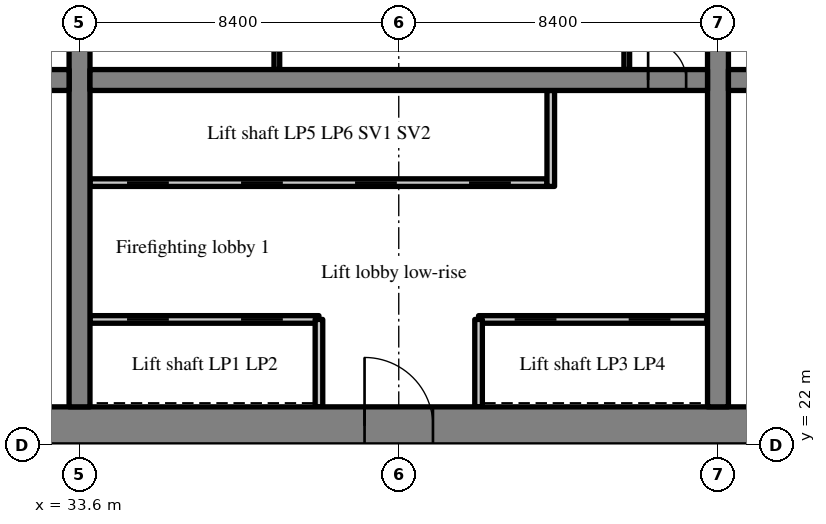
"""IFC4 building model, lengths in metres.
Left out: names, types, materials, properties, quantities, classifications, styles, units other than length and angle.
Written with IfcOpenShell. Run it as: python <this file> out.ifc"""

import sys

from ifc_helpers import new_model, si_unit, direction, frame, frame_2d, origin, place, context, subcontext, project, spatial, rectangle, extrude, source, transform, mapped, element, fill, save


model = new_model("IFC4")
c1 = context("Model", 3, precision=1e-05, world=origin(), true_north=direction((0.0, 1.0)))
c2 = subcontext(c1, "Body", "Model", "MODEL_VIEW")
j1 = project(units=[si_unit("LENGTHUNIT", "METRE"), si_unit("PLANEANGLEUNIT", "RADIAN")], contexts=[c1])
p1 = place(None, origin())
s1 = spatial("IfcSite", under=j1, at=p1, CompositionType="ELEMENT")
p2 = place(p1, origin())
s2 = spatial("IfcBuilding", under=s1, at=p2, CompositionType="ELEMENT")
p3 = place(p2, frame((0.0, 0.0, 62.0)))
s3 = spatial("IfcBuildingStorey", under=s2, at=p3, CompositionType="ELEMENT", Elevation=62.0)
m1 = source(origin(), c2, "Body", "SweptSolid", [
    extrude(rectangle(XDim=50.4, YDim=1.0, at=frame_2d((25.2, 0.0))), origin(), (0.0, 0.0, 1.0), 3.52),
])
p4 = place(p3, frame((25.2, 22.5, 0.0), z_axis=(0.0, 0.0, 1.0), x_axis=(1.0, 0.0, 0.0)))
e1 = element("IfcWall", 1, at=p4, inside=s3, PredefinedType="SHEAR", context=c2, shape_type="MappedRepresentation", body=[
    mapped(m1, transform((0.0, 0.0, 0.0), scale=1.0)),
])
m2 = source(origin(), c2, "Body", "SweptSolid", [
    extrude(rectangle(XDim=1.8, YDim=2.1, at=frame_2d((0.9, 1.05))), frame((0.0, 0.51, 0.0), z_axis=(0.0, -1.0, 0.0), x_axis=(1.0, 0.0, 0.0)), (0.0, 0.0, 1.0), 1.02),
])
p5 = place(p4, frame((15.9, 0.0, 0.0)))
e2 = element("IfcOpeningElement", 2, at=p5, cuts=e1, PredefinedType="OPENING", context=c2, shape_type="MappedRepresentation", body=[
    mapped(m2, transform((0.0, 0.0, 0.0), scale=1.0)),
])
m3 = source(origin(), c2, "Body", "SweptSolid", [
    extrude(rectangle(XDim=1.2, YDim=2.1, at=frame_2d((0.6, 1.05))), frame((0.0, 0.51, 0.0), z_axis=(0.0, -1.0, 0.0), x_axis=(1.0, 0.0, 0.0)), (0.0, 0.0, 1.0), 1.02),
])
p6 = place(p4, frame((26.987, 0.0, 0.0)))
e3 = element("IfcOpeningElement", 3, at=p6, cuts=e1, PredefinedType="OPENING", context=c2, shape_type="MappedRepresentation", body=[
    mapped(m3, transform((0.0, 0.0, 0.0), scale=1.0)),
])
m4 = source(origin(), c2, "Body", "SweptSolid", [
    extrude(rectangle(XDim=0.9, YDim=2.1, at=frame_2d((0.45, 1.05))), frame((0.0, 0.51, 0.0), z_axis=(0.0, -1.0, 0.0), x_axis=(1.0, 0.0, 0.0)), (0.0, 0.0, 1.0), 1.02),
])
p7 = place(p4, frame((34.5, 0.0, 0.0)))
e4 = element("IfcOpeningElement", 4, at=p7, cuts=e1, PredefinedType="OPENING", context=c2, shape_type="MappedRepresentation", body=[
    mapped(m4, transform((0.0, 0.0, 0.0), scale=1.0)),
])
p8 = place(p4, frame((31.5, 0.0, 0.0)))
e5 = element("IfcOpeningElement", 5, at=p8, cuts=e1, PredefinedType="OPENING", context=c2, shape_type="MappedRepresentation", body=[
    mapped(m4, transform((0.0, 0.0, 0.0), scale=1.0)),
])
p9 = place(p4, frame((39.769, 0.0, 0.0)))
e6 = element("IfcOpeningElement", 6, at=p9, cuts=e1, PredefinedType="OPENING", context=c2, shape_type="MappedRepresentation", body=[
    mapped(m4, transform((0.0, 0.0, 0.0), scale=1.0)),
])
p10 = place(p4, frame((36.756, 0.0, 0.0)))
e7 = element("IfcOpeningElement", 7, at=p10, cuts=e1, PredefinedType="OPENING", context=c2, shape_type="MappedRepresentation", body=[
    mapped(m4, transform((0.0, 0.0, 0.0), scale=1.0)),
])
p11 = place(p4, frame((6.438, 0.0, 0.0)))
e8 = element("IfcOpeningElement", 8, at=p11, cuts=e1, PredefinedType="OPENING", context=c2, shape_type="MappedRepresentation", body=[
    mapped(m3, transform((0.0, 0.0, 0.0), scale=1.0)),
])
p12 = place(p4, frame((47.725, 0.0, 0.0)))
e9 = element("IfcOpeningElement", 9, at=p12, cuts=e1, PredefinedType="OPENING", context=c2, shape_type="MappedRepresentation", body=[
    mapped(m3, transform((0.0, 0.0, 0.0), scale=1.0)),
])
m5 = source(origin(), c2, "Body", "SweptSolid", [
    extrude(rectangle(XDim=18.0, YDim=0.55, at=frame_2d((9.0, 0.0))), origin(), (0.0, 0.0, 1.0), 3.52),
])
p13 = place(p3, frame((33.6, 23.0, 0.0), z_axis=(0.0, 0.0, 1.0), x_axis=(0.0, 1.0, 0.0)))
e10 = element("IfcWall", 10, at=p13, inside=s3, PredefinedType="SHEAR", context=c2, shape_type="MappedRepresentation", body=[
    mapped(m5, transform((0.0, 0.0, 0.0), scale=1.0)),
])
m6 = source(origin(), c2, "Body", "SweptSolid", [
    extrude(rectangle(XDim=1.1, YDim=2.1, at=frame_2d((0.55, 1.05))), frame((0.0, 0.285, 0.0), z_axis=(0.0, -1.0, 0.0), x_axis=(1.0, 0.0, 0.0)), (0.0, 0.0, 1.0), 0.57),
])
p14 = place(p13, frame((12.45, 0.0, 0.0)))
e11 = element("IfcOpeningElement", 11, at=p14, cuts=e10, PredefinedType="OPENING", context=c2, shape_type="MappedRepresentation", body=[
    mapped(m6, transform((0.0, 0.0, 0.0), scale=1.0)),
])
p15 = place(p3, frame((50.4, 23.0, 0.0), z_axis=(0.0, 0.0, 1.0), x_axis=(0.0, 1.0, 0.0)))
e12 = element("IfcWall", 12, at=p15, inside=s3, PredefinedType="SHEAR", context=c2, shape_type="MappedRepresentation", body=[
    mapped(m5, transform((0.0, 0.0, 0.0), scale=1.0)),
])
p16 = place(p15, frame((12.45, 0.0, 0.0)))
e13 = element("IfcOpeningElement", 13, at=p16, cuts=e12, PredefinedType="OPENING", context=c2, shape_type="MappedRepresentation", body=[
    mapped(m6, transform((0.0, 0.0, 0.0), scale=1.0)),
])
m7 = source(origin(), c2, "Body", "SweptSolid", [
    extrude(rectangle(XDim=7.125, YDim=0.55, at=frame_2d((3.562, 0.0))), origin(), (0.0, 0.0, 1.0), 3.52),
])
p17 = place(p3, frame((26.2, 31.6, 0.0), z_axis=(0.0, 0.0, 1.0), x_axis=(1.0, 0.0, 0.0)))
e14 = element("IfcWall", 14, at=p17, inside=s3, PredefinedType="SHEAR", context=c2, shape_type="MappedRepresentation", body=[
    mapped(m7, transform((0.0, 0.0, 0.0), scale=1.0)),
])
p18 = place(p17, frame((5.488, 0.0, 0.0)))
e15 = element("IfcOpeningElement", 15, at=p18, cuts=e14, PredefinedType="OPENING", context=c2, shape_type="MappedRepresentation", body=[
    mapped(m6, transform((0.0, 0.0, 0.0), scale=1.0)),
])
m8 = source(origin(), c2, "Body", "SweptSolid", [
    extrude(rectangle(XDim=16.25, YDim=0.55, at=frame_2d((8.125, 0.0))), origin(), (0.0, 0.0, 1.0), 3.52),
])
p19 = place(p3, frame((33.875, 31.6, 0.0), z_axis=(0.0, 0.0, 1.0), x_axis=(1.0, 0.0, 0.0)))
e16 = element("IfcWall", 16, at=p19, inside=s3, PredefinedType="SHEAR", context=c2, shape_type="MappedRepresentation", body=[
    mapped(m8, transform((0.0, 0.0, 0.0), scale=1.0)),
])
m9 = source(origin(), c2, "Body", "SweptSolid", [
    extrude(rectangle(XDim=1.0, YDim=2.1, at=frame_2d((0.5, 1.05))), frame((0.0, 0.285, 0.0), z_axis=(0.0, -1.0, 0.0), x_axis=(1.0, 0.0, 0.0)), (0.0, 0.0, 1.0), 0.57),
])
p20 = place(p19, frame((14.687, 0.0, 0.0)))
e17 = element("IfcOpeningElement", 17, at=p20, cuts=e16, PredefinedType="OPENING", context=c2, shape_type="MappedRepresentation", body=[
    mapped(m9, transform((0.0, 0.0, 0.0), scale=1.0)),
])
p21 = place(p3, frame((50.675, 31.6, 0.0), z_axis=(0.0, 0.0, 1.0), x_axis=(1.0, 0.0, 0.0)))
e18 = element("IfcWall", 18, at=p21, inside=s3, PredefinedType="SHEAR", context=c2, shape_type="MappedRepresentation", body=[
    mapped(m8, transform((0.0, 0.0, 0.0), scale=1.0)),
])
p22 = place(p21, frame((0.562, 0.0, 0.0)))
e19 = element("IfcOpeningElement", 19, at=p22, cuts=e18, PredefinedType="OPENING", context=c2, shape_type="MappedRepresentation", body=[
    mapped(m9, transform((0.0, 0.0, 0.0), scale=1.0)),
])
m10 = source(origin(), c2, "Body", "SweptSolid", [
    extrude(rectangle(XDim=6.025, YDim=0.2, at=frame_2d((3.012, 0.0))), origin(), (0.0, 0.0, 1.0), 3.52),
])
p23 = place(p3, frame((33.875, 25.3, 0.0), z_axis=(0.0, 0.0, 1.0), x_axis=(1.0, 0.0, 0.0)))
e20 = element("IfcWall", 20, at=p23, inside=s3, PredefinedType="SOLIDWALL", context=c2, shape_type="MappedRepresentation", body=[
    mapped(m10, transform((0.0, 0.0, 0.0), scale=1.0)),
])
m11 = source(origin(), c2, "Body", "SweptSolid", [
    extrude(rectangle(XDim=1.1, YDim=2.1, at=frame_2d((0.55, 1.05))), frame((0.0, 0.11, 0.0), z_axis=(0.0, -1.0, 0.0), x_axis=(1.0, 0.0, 0.0)), (0.0, 0.0, 1.0), 0.22),
])
p24 = place(p23, frame((0.975, 0.0, 0.0)))
e21 = element("IfcOpeningElement", 21, at=p24, cuts=e20, PredefinedType="OPENING", context=c2, shape_type="MappedRepresentation", body=[
    mapped(m11, transform((0.0, 0.0, 0.0), scale=1.0)),
])
p25 = place(p23, frame((3.975, 0.0, 0.0)))
e22 = element("IfcOpeningElement", 22, at=p25, cuts=e20, PredefinedType="OPENING", context=c2, shape_type="MappedRepresentation", body=[
    mapped(m11, transform((0.0, 0.0, 0.0), scale=1.0)),
])
m12 = source(origin(), c2, "Body", "SweptSolid", [
    extrude(rectangle(XDim=6.0, YDim=0.2, at=frame_2d((3.0, 0.0))), origin(), (0.0, 0.0, 1.0), 3.52),
])
p26 = place(p3, frame((44.1, 25.3, 0.0), z_axis=(0.0, 0.0, 1.0), x_axis=(1.0, 0.0, 0.0)))
e23 = element("IfcWall", 23, at=p26, inside=s3, PredefinedType="SOLIDWALL", context=c2, shape_type="MappedRepresentation", body=[
    mapped(m12, transform((0.0, 0.0, 0.0), scale=1.0)),
])
p27 = place(p26, frame((0.95, 0.0, 0.0)))
e24 = element("IfcOpeningElement", 24, at=p27, cuts=e23, PredefinedType="OPENING", context=c2, shape_type="MappedRepresentation", body=[
    mapped(m11, transform((0.0, 0.0, 0.0), scale=1.0)),
])
p28 = place(p26, frame((3.95, 0.0, 0.0)))
e25 = element("IfcOpeningElement", 25, at=p28, cuts=e23, PredefinedType="OPENING", context=c2, shape_type="MappedRepresentation", body=[
    mapped(m11, transform((0.0, 0.0, 0.0), scale=1.0)),
])
m13 = source(origin(), c2, "Body", "SweptSolid", [
    extrude(rectangle(XDim=12.025, YDim=0.2, at=frame_2d((6.012, 0.0))), origin(), (0.0, 0.0, 1.0), 3.52),
])
p29 = place(p3, frame((33.875, 28.9, 0.0), z_axis=(0.0, 0.0, 1.0), x_axis=(1.0, 0.0, 0.0)))
e26 = element("IfcWall", 26, at=p29, inside=s3, PredefinedType="SOLIDWALL", context=c2, shape_type="MappedRepresentation", body=[
    mapped(m13, transform((0.0, 0.0, 0.0), scale=1.0)),
])
p30 = place(p29, frame((0.975, 0.0, 0.0)))
e27 = element("IfcOpeningElement", 27, at=p30, cuts=e26, PredefinedType="OPENING", context=c2, shape_type="MappedRepresentation", body=[
    mapped(m11, transform((0.0, 0.0, 0.0), scale=1.0)),
])
p31 = place(p29, frame((3.975, 0.0, 0.0)))
e28 = element("IfcOpeningElement", 28, at=p31, cuts=e26, PredefinedType="OPENING", context=c2, shape_type="MappedRepresentation", body=[
    mapped(m11, transform((0.0, 0.0, 0.0), scale=1.0)),
])
p32 = place(p29, frame((6.975, 0.0, 0.0)))
e29 = element("IfcOpeningElement", 29, at=p32, cuts=e26, PredefinedType="OPENING", context=c2, shape_type="MappedRepresentation", body=[
    mapped(m11, transform((0.0, 0.0, 0.0), scale=1.0)),
])
p33 = place(p29, frame((9.975, 0.0, 0.0)))
e30 = element("IfcOpeningElement", 30, at=p33, cuts=e26, PredefinedType="OPENING", context=c2, shape_type="MappedRepresentation", body=[
    mapped(m11, transform((0.0, 0.0, 0.0), scale=1.0)),
])
m14 = source(origin(), c2, "Body", "SweptSolid", [
    extrude(rectangle(XDim=2.3, YDim=0.2, at=frame_2d((1.15, 0.0))), origin(), (0.0, 0.0, 1.0), 3.52),
])
for number, where, z_axis, x_axis in (
    (31, (39.9, 23.0, 0.0), (0.0, 0.0, 1.0), (0.0, 1.0, 0.0)),
    (32, (44.1, 23.0, 0.0), (0.0, 0.0, 1.0), (0.0, 1.0, 0.0)),
):
    element("IfcWall", number, at=place(p3, frame(where, z_axis=z_axis, x_axis=x_axis)), inside=s3, PredefinedType="SOLIDWALL", context=c2, shape_type="MappedRepresentation", body=[
        mapped(m14, transform((0.0, 0.0, 0.0), scale=1.0)),
    ])
m15 = source(origin(), c2, "Body", "SweptSolid", [
    extrude(rectangle(XDim=2.525, YDim=0.2, at=frame_2d((1.262, 0.0))), origin(), (0.0, 0.0, 1.0), 3.52),
])
p34 = place(p3, frame((46.0, 28.8, 0.0), z_axis=(0.0, 0.0, 1.0), x_axis=(0.0, 1.0, 0.0)))
e33 = element("IfcWall", 33, at=p34, inside=s3, PredefinedType="SOLIDWALL", context=c2, shape_type="MappedRepresentation", body=[
    mapped(m15, transform((0.0, 0.0, 0.0), scale=1.0)),
])
m16 = source(origin(), c2, "Body", "SweptSolid", [
    extrude(rectangle(XDim=3.125, YDim=0.15, at=frame_2d((1.562, 0.0))), origin(), (0.0, 0.0, 1.0), 3.52),
])
for number, where, z_axis, x_axis in (
    (34, (48.0, 31.875, 0.0), (0.0, 0.0, 1.0), (0.0, 1.0, 0.0)),
    (35, (38.792, 31.875, 0.0), (0.0, 0.0, 1.0), (0.0, 1.0, 0.0)),
):
    element("IfcWall", number, at=place(p3, frame(where, z_axis=z_axis, x_axis=x_axis)), inside=s3, PredefinedType="PARTITIONING", context=c2, shape_type="MappedRepresentation", body=[
        mapped(m16, transform((0.0, 0.0, 0.0), scale=1.0)),
    ])
m17 = source(origin(), c2, "Body", "SweptSolid", [
    extrude(rectangle(XDim=1.8, YDim=2.1, at=frame_2d((0.9, 1.05))), frame((0.0, 0.375, 0.0), z_axis=(0.0, -1.0, 0.0), x_axis=(1.0, 0.0, 0.0)), (0.0, 0.0, 1.0), 0.05),
])
p35 = place(p5, origin())
e36 = element("IfcDoor", 36, at=p35, inside=s3, OperationType="DOUBLE_DOOR_SINGLE_SWING", PredefinedType="DOOR", context=c2, shape_type="MappedRepresentation", body=[
    mapped(m17, transform((0.0, 0.0, 0.0), scale=1.0)),
])
fill(e2, e36)
m18 = source(origin(), c2, "Body", "SweptSolid", [
    extrude(rectangle(XDim=1.0, YDim=2.1, at=frame_2d((0.5, 1.05))), frame((0.0, 0.025, 0.0), z_axis=(0.0, -1.0, 0.0), x_axis=(1.0, 0.0, 0.0)), (0.0, 0.0, 1.0), 0.05),
])
p36 = place(p20, origin())
e37 = element("IfcDoor", 37, at=p36, inside=s3, OperationType="SINGLE_SWING_LEFT", PredefinedType="DOOR", context=c2, shape_type="MappedRepresentation", body=[
    mapped(m18, transform((0.0, 0.0, 0.0), scale=1.0)),
])
fill(e17, e37)
m19 = source(origin(), c2, "Body", "SweptSolid", [
    extrude(rectangle(XDim=1.1, YDim=2.1, at=frame_2d((0.55, 1.05))), frame((0.0, 0.025, 0.0), z_axis=(0.0, -1.0, 0.0), x_axis=(1.0, 0.0, 0.0)), (0.0, 0.0, 1.0), 0.05),
])
p37 = place(p24, origin())
e38 = element("IfcDoor", 38, at=p37, inside=s3, OperationType="SLIDING_TO_LEFT", PredefinedType="DOOR", context=c2, shape_type="MappedRepresentation", body=[
    mapped(m19, transform((0.0, 0.0, 0.0), scale=1.0)),
])
fill(e21, e38)
p38 = place(p25, origin())
e39 = element("IfcDoor", 39, at=p38, inside=s3, OperationType="SLIDING_TO_RIGHT", PredefinedType="DOOR", context=c2, shape_type="MappedRepresentation", body=[
    mapped(m19, transform((0.0, 0.0, 0.0), scale=1.0)),
])
fill(e22, e39)
p39 = place(p27, origin())
e40 = element("IfcDoor", 40, at=p39, inside=s3, OperationType="SLIDING_TO_LEFT", PredefinedType="DOOR", context=c2, shape_type="MappedRepresentation", body=[
    mapped(m19, transform((0.0, 0.0, 0.0), scale=1.0)),
])
fill(e24, e40)
p40 = place(p28, origin())
e41 = element("IfcDoor", 41, at=p40, inside=s3, OperationType="SLIDING_TO_RIGHT", PredefinedType="DOOR", context=c2, shape_type="MappedRepresentation", body=[
    mapped(m19, transform((0.0, 0.0, 0.0), scale=1.0)),
])
fill(e25, e41)
p41 = place(p30, origin())
e42 = element("IfcDoor", 42, at=p41, inside=s3, OperationType="SLIDING_TO_LEFT", PredefinedType="DOOR", context=c2, shape_type="MappedRepresentation", body=[
    mapped(m19, transform((0.0, 0.0, 0.0), scale=1.0)),
])
fill(e27, e42)
p42 = place(p31, origin())
e43 = element("IfcDoor", 43, at=p42, inside=s3, OperationType="SLIDING_TO_RIGHT", PredefinedType="DOOR", context=c2, shape_type="MappedRepresentation", body=[
    mapped(m19, transform((0.0, 0.0, 0.0), scale=1.0)),
])
fill(e28, e43)
p43 = place(p32, origin())
e44 = element("IfcDoor", 44, at=p43, inside=s3, OperationType="SLIDING_TO_LEFT", PredefinedType="DOOR", context=c2, shape_type="MappedRepresentation", body=[
    mapped(m19, transform((0.0, 0.0, 0.0), scale=1.0)),
])
fill(e29, e44)
p44 = place(p33, origin())
e45 = element("IfcDoor", 45, at=p44, inside=s3, OperationType="SLIDING_TO_RIGHT", PredefinedType="DOOR", context=c2, shape_type="MappedRepresentation", body=[
    mapped(m19, transform((0.0, 0.0, 0.0), scale=1.0)),
])
fill(e30, e45)
save(model, sys.argv[1])
